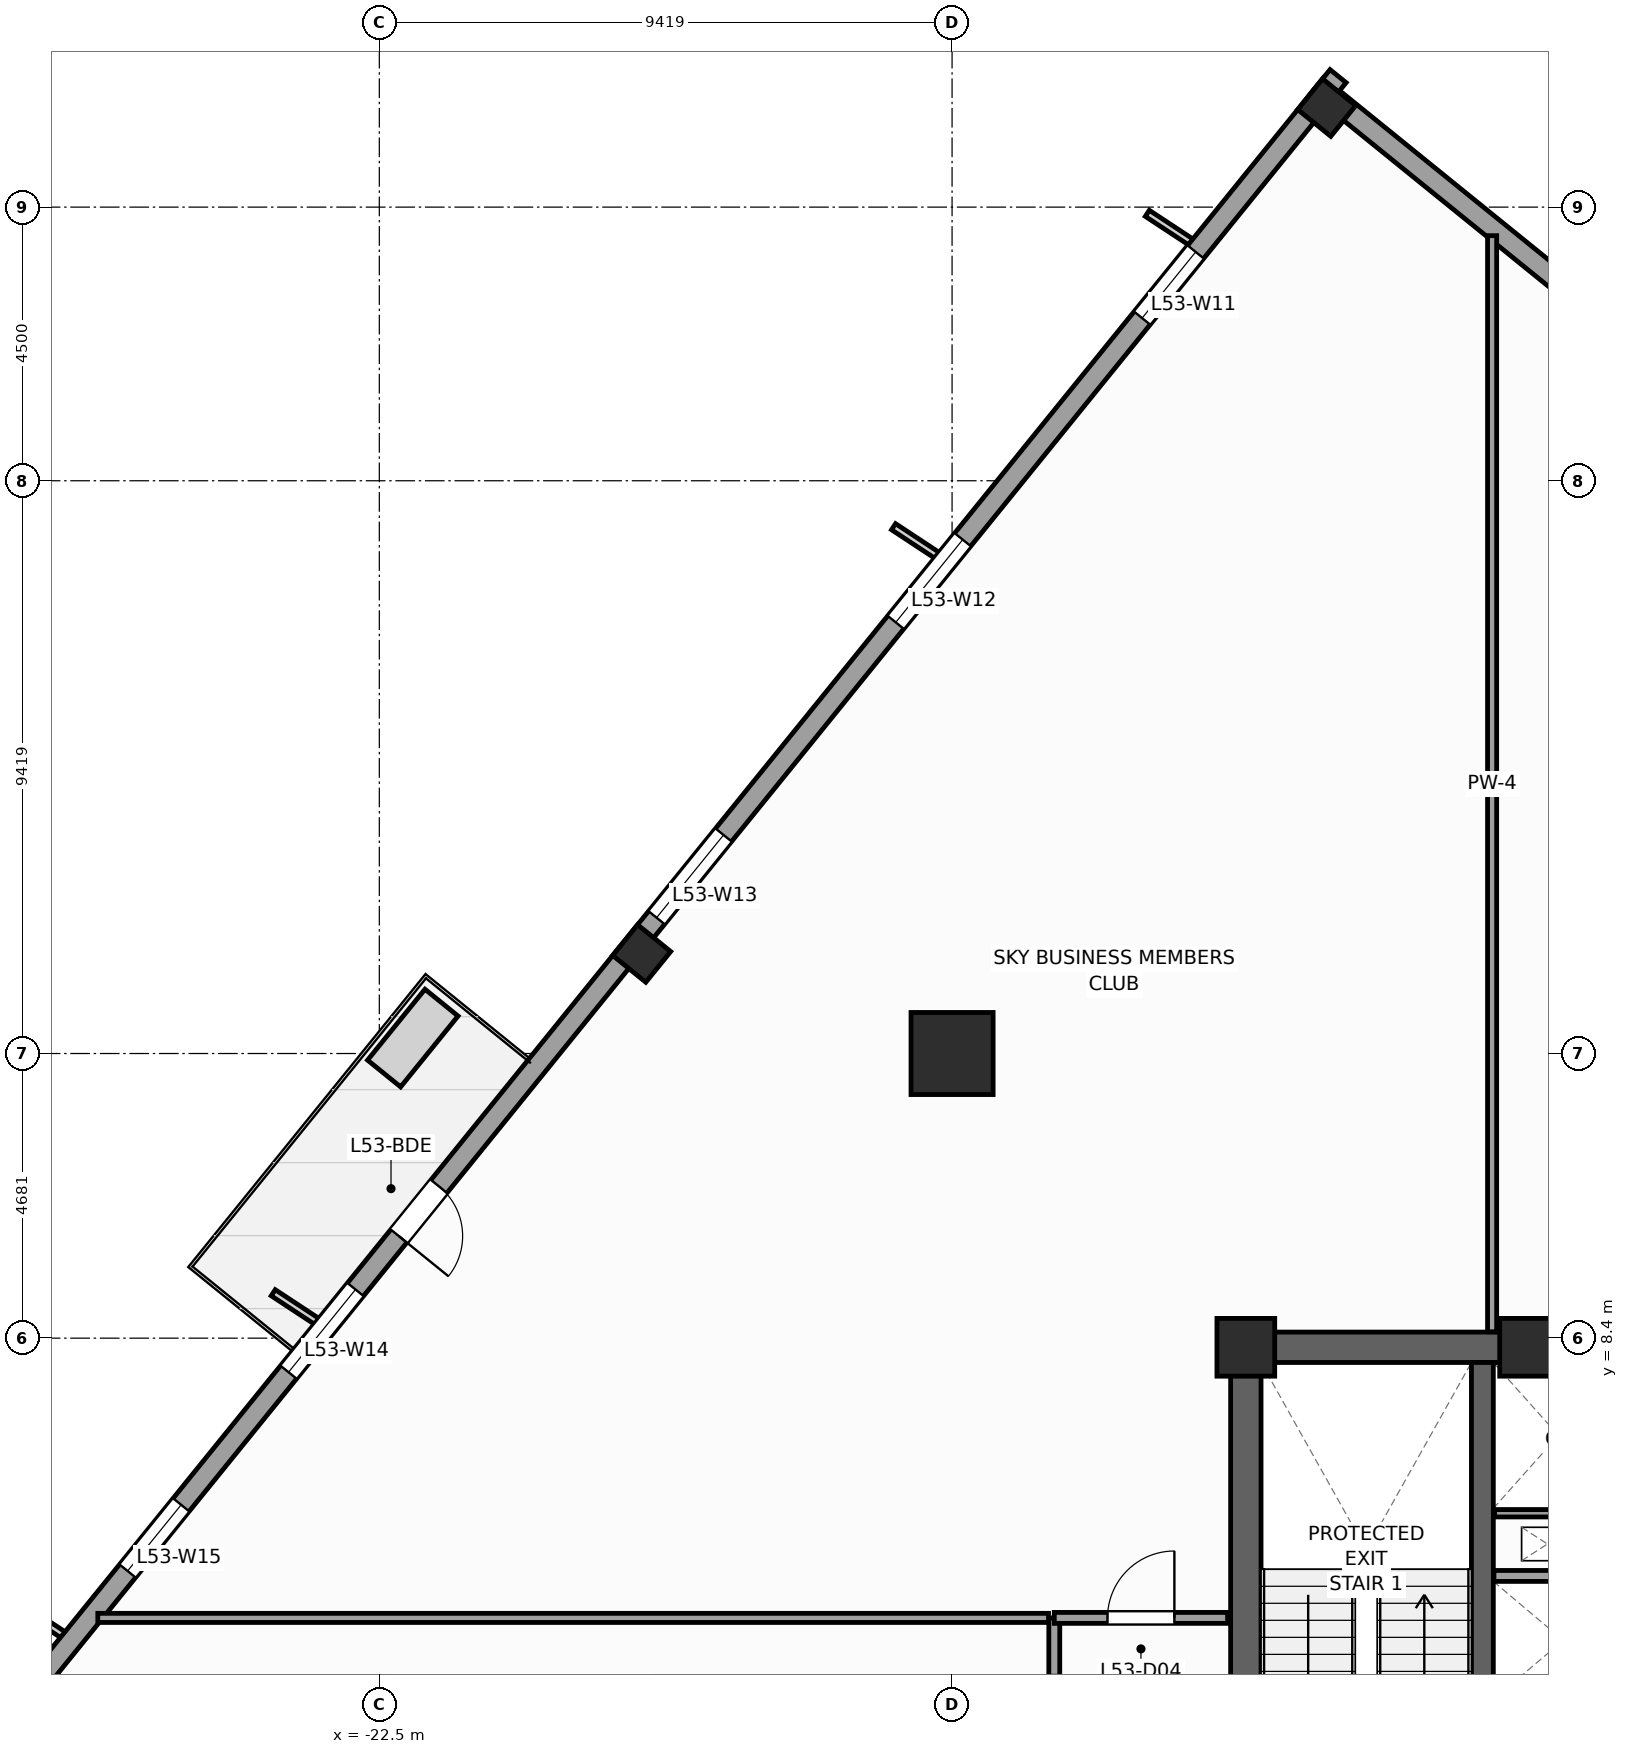
"""IFC4 building model, lengths in metres.
Left out: names, types, materials, properties, quantities, classifications, styles, units other than length and angle.
Written with IfcOpenShell. Run it as: python <this file> out.ifc"""

import sys

from ifc_helpers import new_model, si_unit, direction, frame, frame_2d, origin, origin_2d, place, context, subcontext, project, spatial, rectangle, extrude, source, transform, mapped, element, fill, save


model = new_model("IFC4")
c1 = context("Model", 3, precision=1e-05, world=origin(), true_north=direction((0.0, 1.0)))
c2 = subcontext(c1, "Body", "Model", "MODEL_VIEW")
j1 = project(units=[si_unit("LENGTHUNIT", "METRE"), si_unit("PLANEANGLEUNIT", "RADIAN")], contexts=[c1])
p1 = place(None, origin())
s1 = spatial("IfcSite", under=j1, at=p1, CompositionType="ELEMENT")
p2 = place(p1, origin())
s2 = spatial("IfcBuilding", under=s1, at=p2, CompositionType="ELEMENT")
p3 = place(p2, frame((0.0, 0.0, 221.2)))
s3 = spatial("IfcBuildingStorey", under=s2, at=p3, CompositionType="ELEMENT", Elevation=221.2)
p4 = place(p3, frame((-8.5, 8.25, 0.0), z_axis=(0.0, 0.0, 1.0), x_axis=(1.0, 0.0, 0.0)))
e1 = element("IfcWall", 1, at=p4, inside=s3, PredefinedType="SHEAR", context=c2, shape_type="SweptSolid", body=[
    extrude(rectangle(XDim=17.0, YDim=0.5, at=frame_2d((8.5, 0.0))), origin(), (0.0, 0.0, 1.0), 3.9),
])
p5 = place(p3, frame((-8.25, -8.0, 0.0), z_axis=(0.0, 0.0, 1.0), x_axis=(0.0, 1.0, 0.0)))
e2 = element("IfcWall", 2, at=p5, inside=s3, PredefinedType="SHEAR", context=c2, shape_type="SweptSolid", body=[
    extrude(rectangle(XDim=16.0, YDim=0.5, at=frame_2d((8.0, 0.0))), origin(), (0.0, 0.0, 1.0), 3.9),
])
p6 = place(p5, frame((4.69, 0.0, 0.0)))
e3 = element("IfcOpeningElement", 3, at=p6, cuts=e2, PredefinedType="OPENING", context=c2, shape_type="SweptSolid", body=[
    extrude(rectangle(XDim=1.3, YDim=2.2, at=frame_2d((0.65, 1.1))), frame((0.0, 0.26, 0.0), z_axis=(0.0, -1.0, 0.0), x_axis=(1.0, 0.0, 0.0)), (0.0, 0.0, 1.0), 0.52),
])
p7 = place(p3, frame((-4.36, -8.0, 0.0), z_axis=(0.0, 0.0, 1.0), x_axis=(0.0, 1.0, 0.0)))
e4 = element("IfcWall", 4, at=p7, inside=s3, PredefinedType="SHEAR", context=c2, shape_type="SweptSolid", body=[
    extrude(rectangle(XDim=16.0, YDim=0.36, at=frame_2d((8.0, 0.0))), origin(), (0.0, 0.0, 1.0), 3.9),
])
m1 = source(origin(), c2, "Body", "SweptSolid", [
    extrude(rectangle(XDim=0.95, YDim=0.95, at=origin_2d()), origin(), (0.0, 0.0, 1.0), 3.9),
])
for number, where, z_axis, x_axis in (
    (5, (-8.25, 8.25, 0.0), (0.0, 0.0, 1.0), (1.0, 0.0, 0.0)),
    (6, (-3.6, 8.25, 0.0), (0.0, 0.0, 1.0), (1.0, 0.0, 0.0)),
):
    element("IfcColumn", number, at=place(p3, frame(where, z_axis=z_axis, x_axis=x_axis)), inside=s3, PredefinedType="PILASTER", context=c2, shape_type="MappedRepresentation", body=[
        mapped(m1, transform((0.0, 0.0, 0.0), scale=1.0)),
    ])
m2 = source(origin(), c2, "Body", "SweptSolid", [
    extrude(rectangle(XDim=1.35, YDim=1.35, at=origin_2d()), origin(), (0.0, 0.0, 1.0), 3.9),
])
p8 = place(p3, frame((-13.081, 13.081, 0.0), z_axis=(0.0, 0.0, 1.0), x_axis=(1.0, 0.0, 0.0)))
e7 = element("IfcColumn", 7, at=p8, inside=s3, PredefinedType="COLUMN", context=c2, shape_type="MappedRepresentation", body=[
    mapped(m2, transform((0.0, 0.0, 0.0), scale=1.0)),
])
m3 = source(origin(), c2, "Body", "SweptSolid", [
    extrude(rectangle(XDim=0.65, YDim=0.7, at=origin_2d()), origin(), (0.0, 0.0, 1.0), 3.9),
])
for number, where, z_axis, x_axis in (
    (8, (-6.92, 28.637, 0.0), (0.0, 0.0, 1.0), (0.629, 0.777, 0.0)),
    (9, (-18.185, 14.726, 0.0), (0.0, 0.0, 1.0), (0.629, 0.777, 0.0)),
):
    element("IfcColumn", number, at=place(p3, frame(where, z_axis=z_axis, x_axis=x_axis)), inside=s3, PredefinedType="COLUMN", context=c2, shape_type="MappedRepresentation", body=[
        mapped(m3, transform((0.0, 0.0, 0.0), scale=1.0)),
    ])
p9 = place(p3, frame((-2.673, 25.429, 0.0), z_axis=(0.0, 0.0, 1.0), x_axis=(-0.777162640055, 0.629299794138, 0.0)))
e10 = element("IfcWall", 10, at=p9, inside=s3, PredefinedType="STANDARD", context=c2, shape_type="SweptSolid", body=[
    extrude(rectangle(XDim=5.67, YDim=0.34, at=frame_2d((2.835, 0.0))), origin(), (0.0, 0.0, 1.0), 3.66),
])
p10 = place(p3, frame((-6.733, 29.154, 0.0), z_axis=(0.0, 0.0, 1.0), x_axis=(-0.629325378072, -0.77714192302, 0.0)))
e11 = element("IfcWall", 11, at=p10, inside=s3, PredefinedType="STANDARD", context=c2, shape_type="SweptSolid", body=[
    extrude(rectangle(XDim=36.84, YDim=0.34, at=frame_2d((18.42, 0.0))), origin(), (0.0, 0.0, 1.0), 2.96),
])
p11 = place(p10, frame((23.495, 0.0, 0.0)))
e12 = element("IfcOpeningElement", 12, at=p11, cuts=e11, PredefinedType="OPENING", context=c2, shape_type="SweptSolid", body=[
    extrude(rectangle(XDim=1.05, YDim=2.25, at=frame_2d((0.525, 1.125))), frame((0.0, 0.18, 0.0), z_axis=(0.0, -1.0, 0.0), x_axis=(1.0, 0.0, 0.0)), (0.0, 0.0, 1.0), 0.36),
])
p12 = place(p10, frame((3.721, 0.0, 0.48)))
e13 = element("IfcOpeningElement", 13, at=p12, cuts=e11, PredefinedType="OPENING", context=c2, shape_type="SweptSolid", body=[
    extrude(rectangle(XDim=1.4, YDim=2.4, at=frame_2d((0.7, 1.2))), frame((0.0, 0.18, 0.0), z_axis=(0.0, -1.0, 0.0), x_axis=(1.0, 0.0, 0.0)), (0.0, 0.0, 1.0), 0.36),
])
p13 = place(p10, frame((9.809, 0.0, 0.58)))
e14 = element("IfcOpeningElement", 14, at=p13, cuts=e11, PredefinedType="OPENING", context=c2, shape_type="SweptSolid", body=[
    extrude(rectangle(XDim=1.75, YDim=2.3, at=frame_2d((0.875, 1.15))), frame((0.0, 0.18, 0.0), z_axis=(0.0, -1.0, 0.0), x_axis=(1.0, 0.0, 0.0)), (0.0, 0.0, 1.0), 0.36),
])
p14 = place(p10, frame((16.058, 0.0, 0.58)))
e15 = element("IfcOpeningElement", 15, at=p14, cuts=e11, PredefinedType="OPENING", context=c2, shape_type="SweptSolid", body=[
    extrude(rectangle(XDim=1.75, YDim=2.3, at=frame_2d((0.875, 1.15))), frame((0.0, 0.18, 0.0), z_axis=(0.0, -1.0, 0.0), x_axis=(1.0, 0.0, 0.0)), (0.0, 0.0, 1.0), 0.36),
])
p15 = place(p10, frame((25.676, 0.0, 0.58)))
e16 = element("IfcOpeningElement", 16, at=p15, cuts=e11, PredefinedType="OPENING", context=c2, shape_type="SweptSolid", body=[
    extrude(rectangle(XDim=1.75, YDim=2.3, at=frame_2d((0.875, 1.15))), frame((0.0, 0.18, 0.0), z_axis=(0.0, -1.0, 0.0), x_axis=(1.0, 0.0, 0.0)), (0.0, 0.0, 1.0), 0.36),
])
p16 = place(p10, frame((30.232, 0.0, 0.48)))
e17 = element("IfcOpeningElement", 17, at=p16, cuts=e11, PredefinedType="OPENING", context=c2, shape_type="SweptSolid", body=[
    extrude(rectangle(XDim=1.4, YDim=2.4, at=frame_2d((0.7, 1.2))), frame((0.0, 0.18, 0.0), z_axis=(0.0, -1.0, 0.0), x_axis=(1.0, 0.0, 0.0)), (0.0, 0.0, 1.0), 0.36),
])
p17 = place(p3, frame((-4.17, 4.49, 0.0), z_axis=(0.0, 0.0, 1.0), x_axis=(1.0, 0.0, 0.0)))
e18 = element("IfcWall", 18, at=p17, inside=s3, PredefinedType="PARTITIONING", context=c2, shape_type="SweptSolid", body=[
    extrude(rectangle(XDim=2.28, YDim=0.18, at=frame_2d((1.14, 0.0))), origin(), (0.0, 0.0, 1.0), 3.66),
])
p18 = place(p3, frame((-4.16, 5.52, 0.0), z_axis=(0.0, 0.0, 1.0), x_axis=(1.0, 0.0, 0.0)))
e19 = element("IfcWall", 19, at=p18, inside=s3, PredefinedType="PARTITIONING", context=c2, shape_type="SweptSolid", body=[
    extrude(rectangle(XDim=2.1, YDim=0.12, at=frame_2d((1.05, 0.0))), origin(), (0.0, 0.0, 1.0), 3.66),
])
p19 = place(p3, frame((-11.4, -10.2, 0.0), z_axis=(0.0, 0.0, 1.0), x_axis=(0.0, 1.0, 0.0)))
e20 = element("IfcWall", 20, at=p19, inside=s3, PredefinedType="PARTITIONING", context=c2, shape_type="SweptSolid", body=[
    extrude(rectangle(XDim=14.0, YDim=0.18, at=frame_2d((7.0, 0.0))), origin(), (0.0, 0.0, 1.0), 3.66),
])
p20 = place(p19, frame((11.96, 0.0, 0.0)))
e21 = element("IfcOpeningElement", 21, at=p20, cuts=e20, PredefinedType="OPENING", context=c2, shape_type="SweptSolid", body=[
    extrude(rectangle(XDim=1.1, YDim=2.2, at=frame_2d((0.55, 1.1))), frame((0.0, 0.1, 0.0), z_axis=(0.0, -1.0, 0.0), x_axis=(1.0, 0.0, 0.0)), (0.0, 0.0, 1.0), 0.2),
])
p21 = place(p19, frame((9.025, 0.0, 0.0)))
e22 = element("IfcOpeningElement", 22, at=p21, cuts=e20, PredefinedType="OPENING", context=c2, shape_type="SweptSolid", body=[
    extrude(rectangle(XDim=1.1, YDim=2.2, at=frame_2d((0.55, 1.1))), frame((0.0, 0.1, 0.0), z_axis=(0.0, -1.0, 0.0), x_axis=(1.0, 0.0, 0.0)), (0.0, 0.0, 1.0), 0.2),
])
p22 = place(p19, frame((4.35, 0.0, 0.0)))
e23 = element("IfcOpeningElement", 23, at=p22, cuts=e20, PredefinedType="OPENING", context=c2, shape_type="SweptSolid", body=[
    extrude(rectangle(XDim=1.1, YDim=2.2, at=frame_2d((0.55, 1.1))), frame((0.0, 0.1, 0.0), z_axis=(0.0, -1.0, 0.0), x_axis=(1.0, 0.0, 0.0)), (0.0, 0.0, 1.0), 0.2),
])
p23 = place(p3, frame((-11.4, 3.8, 0.0), z_axis=(0.0, 0.0, 1.0), x_axis=(1.0, 0.0, 0.0)))
e24 = element("IfcWall", 24, at=p23, inside=s3, PredefinedType="PARTITIONING", context=c2, shape_type="SweptSolid", body=[
    extrude(rectangle(XDim=2.85, YDim=0.18, at=frame_2d((1.425, 0.0))), origin(), (0.0, 0.0, 1.0), 3.66),
])
p24 = place(p23, frame((0.875, 0.0, 0.0)))
e25 = element("IfcOpeningElement", 25, at=p24, cuts=e24, PredefinedType="OPENING", context=c2, shape_type="SweptSolid", body=[
    extrude(rectangle(XDim=1.1, YDim=2.2, at=frame_2d((0.55, 1.1))), frame((0.0, 0.1, 0.0), z_axis=(0.0, -1.0, 0.0), x_axis=(1.0, 0.0, 0.0)), (0.0, 0.0, 1.0), 0.2),
])
p25 = place(p3, frame((-4.2, 8.505, 0.0), z_axis=(0.0, 0.0, 1.0), x_axis=(0.0, 1.0, 0.0)))
e26 = element("IfcWall", 26, at=p25, inside=s3, PredefinedType="PARTITIONING", context=c2, shape_type="SweptSolid", body=[
    extrude(rectangle(XDim=18.026, YDim=0.15, at=frame_2d((9.013, 0.0))), origin(), (0.0, 0.0, 1.0), 3.66),
])
p26 = place(p3, frame((-27.129, 3.8, 0.0), z_axis=(0.0, 0.0, 1.0), x_axis=(1.0, 0.0, 0.0)))
e27 = element("IfcWall", 27, at=p26, inside=s3, PredefinedType="PARTITIONING", context=c2, shape_type="SweptSolid", body=[
    extrude(rectangle(XDim=15.634, YDim=0.15, at=frame_2d((7.817, 0.0))), origin(), (0.0, 0.0, 1.0), 3.66),
])
m4 = source(origin(), c2, "Body", "SweptSolid", [
    extrude(rectangle(XDim=1.05, YDim=2.25, at=frame_2d((0.525, 1.125))), frame((0.0, 0.025, 0.0), z_axis=(0.0, -1.0, 0.0), x_axis=(1.0, 0.0, 0.0)), (0.0, 0.0, 1.0), 0.05),
])
p27 = place(p11, origin())
e28 = element("IfcDoor", 28, at=p27, inside=s3, OperationType="SINGLE_SWING_RIGHT", PredefinedType="DOOR", context=c2, shape_type="MappedRepresentation", body=[
    mapped(m4, transform((0.0, 0.0, 0.0), scale=1.0)),
])
fill(e12, e28)
m5 = source(origin(), c2, "Body", "SweptSolid", [
    extrude(rectangle(XDim=1.4, YDim=2.4, at=frame_2d((0.7, 1.2))), frame((0.0, 0.03, 0.0), z_axis=(0.0, -1.0, 0.0), x_axis=(1.0, 0.0, 0.0)), (0.0, 0.0, 1.0), 0.06),
])
p28 = place(p12, origin())
e29 = element("IfcWindow", 29, at=p28, inside=s3, PartitioningType="SINGLE_PANEL", PredefinedType="WINDOW", context=c2, shape_type="MappedRepresentation", body=[
    mapped(m5, transform((0.0, 0.0, 0.0), scale=1.0)),
])
fill(e13, e29)
m6 = source(origin(), c2, "Body", "SweptSolid", [
    extrude(rectangle(XDim=1.75, YDim=2.3, at=frame_2d((0.875, 1.15))), frame((0.0, 0.03, 0.0), z_axis=(0.0, -1.0, 0.0), x_axis=(1.0, 0.0, 0.0)), (0.0, 0.0, 1.0), 0.06),
])
p29 = place(p13, origin())
e30 = element("IfcWindow", 30, at=p29, inside=s3, PartitioningType="SINGLE_PANEL", PredefinedType="WINDOW", context=c2, shape_type="MappedRepresentation", body=[
    mapped(m6, transform((0.0, 0.0, 0.0), scale=1.0)),
])
fill(e14, e30)
p30 = place(p14, origin())
e31 = element("IfcWindow", 31, at=p30, inside=s3, PartitioningType="SINGLE_PANEL", PredefinedType="WINDOW", context=c2, shape_type="MappedRepresentation", body=[
    mapped(m6, transform((0.0, 0.0, 0.0), scale=1.0)),
])
fill(e15, e31)
p31 = place(p15, origin())
e32 = element("IfcWindow", 32, at=p31, inside=s3, PartitioningType="SINGLE_PANEL", PredefinedType="WINDOW", context=c2, shape_type="MappedRepresentation", body=[
    mapped(m6, transform((0.0, 0.0, 0.0), scale=1.0)),
])
fill(e16, e32)
p32 = place(p16, origin())
e33 = element("IfcWindow", 33, at=p32, inside=s3, PartitioningType="SINGLE_PANEL", PredefinedType="WINDOW", context=c2, shape_type="MappedRepresentation", body=[
    mapped(m5, transform((0.0, 0.0, 0.0), scale=1.0)),
])
fill(e17, e33)
m7 = source(origin(), c2, "Body", "SweptSolid", [
    extrude(rectangle(XDim=1.1, YDim=2.2, at=frame_2d((0.55, 1.1))), frame((0.0, 0.025, 0.0), z_axis=(0.0, -1.0, 0.0), x_axis=(1.0, 0.0, 0.0)), (0.0, 0.0, 1.0), 0.05),
])
p33 = place(p24, origin())
e34 = element("IfcDoor", 34, at=p33, inside=s3, OperationType="SINGLE_SWING_RIGHT", PredefinedType="DOOR", context=c2, shape_type="MappedRepresentation", body=[
    mapped(m7, transform((0.0, 0.0, 0.0), scale=1.0)),
])
fill(e25, e34)
save(model, sys.argv[1])
